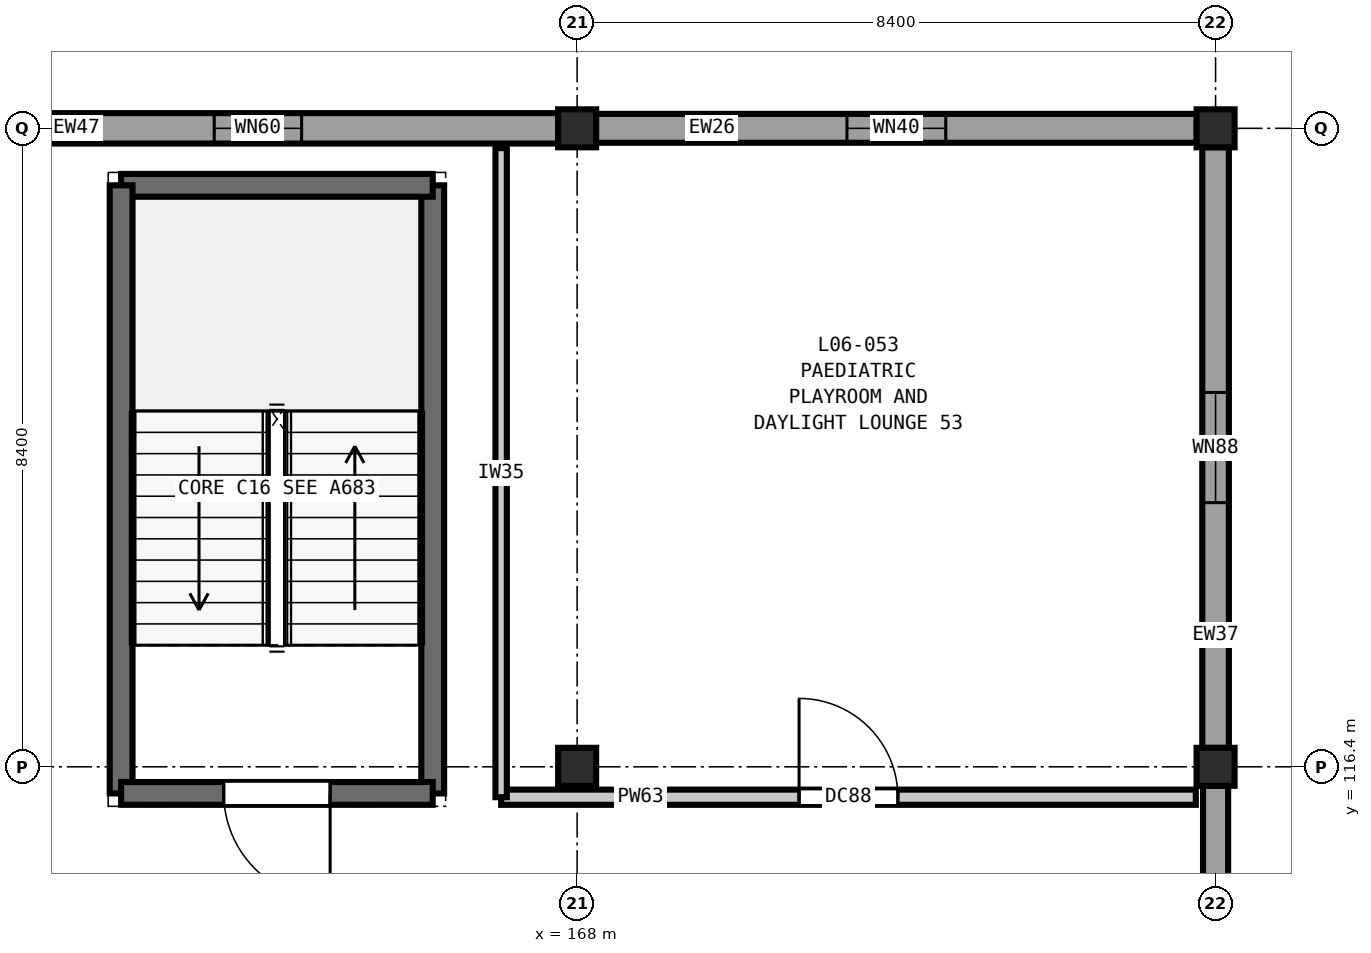
"""IFC4 building model, lengths in metres.
Left out: names, types, materials, properties, quantities, classifications, styles, units other than length and angle.
Written with IfcOpenShell. Run it as: python <this file> out.ifc"""

import sys

from ifc_helpers import new_model, si_unit, direction, frame, frame_2d, origin, origin_2d, place, context, subcontext, project, spatial, rectangle, extrude, element, fill, save


model = new_model("IFC4")
c1 = context("Model", 3, precision=1e-05, world=origin(), true_north=direction((0.0, 1.0)))
c2 = subcontext(c1, "Body", "Model", "MODEL_VIEW")
j1 = project(units=[si_unit("LENGTHUNIT", "METRE"), si_unit("PLANEANGLEUNIT", "RADIAN")], contexts=[c1])
p1 = place(None, origin())
s1 = spatial("IfcSite", under=j1, at=p1, CompositionType="ELEMENT")
p2 = place(p1, origin())
s2 = spatial("IfcBuilding", under=s1, at=p2, CompositionType="ELEMENT")
p3 = place(p2, frame((0.0, 0.0, 28.8)))
s3 = spatial("IfcBuildingStorey", under=s2, at=p3, CompositionType="ELEMENT", Elevation=28.8)
for number, where, z_axis, x_axis in (
    (1, (168.0, 116.4, 0.0), (0.0, 0.0, 1.0), (1.0, 0.0, 0.0)),
    (2, (168.0, 124.8, 0.0), (0.0, 0.0, 1.0), (1.0, 0.0, 0.0)),
    (3, (176.4, 116.4, 0.0), (0.0, 0.0, 1.0), (1.0, 0.0, 0.0)),
    (4, (176.4, 124.8, 0.0), (0.0, 0.0, 1.0), (1.0, 0.0, 0.0)),
):
    element("IfcColumn", number, at=place(p3, frame(where, z_axis=z_axis, x_axis=x_axis)), inside=s3, PredefinedType="COLUMN", context=c2, shape_type="SweptSolid", body=[
        extrude(rectangle(XDim=0.5, YDim=0.5, at=origin_2d()), origin(), (0.0, 0.0, 1.0), 4.2),
    ])
p4 = place(p3, frame((159.848, 124.8, 0.0), z_axis=(0.0, 0.0, 1.0), x_axis=(1.0, 0.0, 0.0)))
e5 = element("IfcWall", 5, at=p4, inside=s3, PredefinedType="SOLIDWALL", context=c2, shape_type="SweptSolid", body=[
    extrude(rectangle(XDim=7.904, YDim=0.4, at=frame_2d((3.952, 0.0))), origin(), (0.0, 0.0, 1.0), 3.48),
])
p5 = place(p4, frame((3.377, 0.0, 0.9)))
e6 = element("IfcOpeningElement", 6, at=p5, cuts=e5, PredefinedType="OPENING", context=c2, shape_type="SweptSolid", body=[
    extrude(rectangle(XDim=1.15, YDim=1.75, at=frame_2d((0.575, 0.875))), frame((0.0, 0.21, 0.0), z_axis=(0.0, -1.0, 0.0), x_axis=(1.0, 0.0, 0.0)), (0.0, 0.0, 1.0), 0.42),
])
p6 = place(p3, frame((168.248, 124.8, 0.0), z_axis=(0.0, 0.0, 1.0), x_axis=(1.0, 0.0, 0.0)))
e7 = element("IfcWall", 7, at=p6, inside=s3, PredefinedType="SOLIDWALL", context=c2, shape_type="SweptSolid", body=[
    extrude(rectangle(XDim=7.904, YDim=0.38, at=frame_2d((3.952, 0.0))), origin(), (0.0, 0.0, 1.0), 3.48),
])
p7 = place(p6, frame((3.302, 0.0, 0.9)))
e8 = element("IfcOpeningElement", 8, at=p7, cuts=e7, PredefinedType="OPENING", context=c2, shape_type="SweptSolid", body=[
    extrude(rectangle(XDim=1.3, YDim=1.75, at=frame_2d((0.65, 0.875))), frame((0.0, 0.2, 0.0), z_axis=(0.0, -1.0, 0.0), x_axis=(1.0, 0.0, 0.0)), (0.0, 0.0, 1.0), 0.4),
])
p8 = place(p3, frame((176.4, 124.552, 0.0), z_axis=(0.0, 0.0, 1.0), x_axis=(0.0, -1.0, 0.0)))
e9 = element("IfcWall", 9, at=p8, inside=s3, PredefinedType="SOLIDWALL", context=c2, shape_type="SweptSolid", body=[
    extrude(rectangle(XDim=7.904, YDim=0.35, at=frame_2d((3.952, 0.0))), origin(), (0.0, 0.0, 1.0), 3.48),
])
p9 = place(p8, frame((3.227, 0.0, 0.9)))
e10 = element("IfcOpeningElement", 10, at=p9, cuts=e9, PredefinedType="OPENING", context=c2, shape_type="SweptSolid", body=[
    extrude(rectangle(XDim=1.45, YDim=1.75, at=frame_2d((0.725, 0.875))), frame((0.0, 0.185, 0.0), z_axis=(0.0, -1.0, 0.0), x_axis=(1.0, 0.0, 0.0)), (0.0, 0.0, 1.0), 0.37),
])
p10 = place(p3, frame((176.4, 116.152, 0.0), z_axis=(0.0, 0.0, 1.0), x_axis=(0.0, -1.0, 0.0)))
e11 = element("IfcWall", 11, at=p10, inside=s3, PredefinedType="SOLIDWALL", context=c2, shape_type="SweptSolid", body=[
    extrude(rectangle(XDim=6.704, YDim=0.33, at=frame_2d((3.352, 0.0))), origin(), (0.0, 0.0, 1.0), 3.48),
])
p11 = place(p3, frame((166.1, 116.05, 0.0), z_axis=(0.0, 0.0, 1.0), x_axis=(0.0, 1.0, 0.0)))
e12 = element("IfcWall", 12, at=p11, inside=s3, PredefinedType="SHEAR", context=c2, shape_type="SweptSolid", body=[
    extrude(rectangle(XDim=8.0, YDim=0.3, at=frame_2d((4.0, 0.0))), origin(), (0.0, 0.0, 1.0), 4.2),
])
p12 = place(p3, frame((166.1, 124.05, 0.0), z_axis=(0.0, 0.0, 1.0), x_axis=(-1.0, 0.0, 0.0)))
e13 = element("IfcWall", 13, at=p12, inside=s3, PredefinedType="SHEAR", context=c2, shape_type="SweptSolid", body=[
    extrude(rectangle(XDim=4.1, YDim=0.3, at=frame_2d((2.05, 0.0))), origin(), (0.0, 0.0, 1.0), 4.2),
])
p13 = place(p3, frame((162.0, 124.05, 0.0), z_axis=(0.0, 0.0, 1.0), x_axis=(0.0, -1.0, 0.0)))
e14 = element("IfcWall", 14, at=p13, inside=s3, PredefinedType="SHEAR", context=c2, shape_type="SweptSolid", body=[
    extrude(rectangle(XDim=8.0, YDim=0.3, at=frame_2d((4.0, 0.0))), origin(), (0.0, 0.0, 1.0), 4.2),
])
p14 = place(p3, frame((162.0, 116.05, 0.0), z_axis=(0.0, 0.0, 1.0), x_axis=(1.0, 0.0, 0.0)))
e15 = element("IfcWall", 15, at=p14, inside=s3, PredefinedType="SHEAR", context=c2, shape_type="SweptSolid", body=[
    extrude(rectangle(XDim=4.1, YDim=0.3, at=frame_2d((2.05, 0.0))), origin(), (0.0, 0.0, 1.0), 4.2),
])
p15 = place(p14, frame((1.35, 0.0, 0.0)))
e16 = element("IfcOpeningElement", 16, at=p15, cuts=e15, PredefinedType="OPENING", context=c2, shape_type="SweptSolid", body=[
    extrude(rectangle(XDim=1.4, YDim=2.2, at=frame_2d((0.7, 1.1))), frame((0.0, 0.16, 0.0), z_axis=(0.0, -1.0, 0.0), x_axis=(1.0, 0.0, 0.0)), (0.0, 0.0, 1.0), 0.32),
])
p16 = place(p3, frame((167.0, 116.0, 0.0), z_axis=(0.0, 0.0, 1.0), x_axis=(1.0, 0.0, 0.0)))
e17 = element("IfcWall", 17, at=p16, inside=s3, PredefinedType="PARTITIONING", context=c2, shape_type="SweptSolid", body=[
    extrude(rectangle(XDim=9.14, YDim=0.2, at=frame_2d((4.57, 0.0))), origin(), (0.0, 0.0, 1.0), 3.92),
])
p17 = place(p16, frame((3.92, 0.0, 0.0)))
e18 = element("IfcOpeningElement", 18, at=p17, cuts=e17, PredefinedType="OPENING", context=c2, shape_type="SweptSolid", body=[
    extrude(rectangle(XDim=1.3, YDim=2.2, at=frame_2d((0.65, 1.1))), frame((0.0, 0.11, 0.0), z_axis=(0.0, -1.0, 0.0), x_axis=(1.0, 0.0, 0.0)), (0.0, 0.0, 1.0), 0.22),
])
p18 = place(p3, frame((167.0, 116.0, 0.0), z_axis=(0.0, 0.0, 1.0), x_axis=(0.0, 1.0, 0.0)))
e19 = element("IfcWall", 19, at=p18, inside=s3, PredefinedType="PARTITIONING", context=c2, shape_type="SweptSolid", body=[
    extrude(rectangle(XDim=8.54, YDim=0.15, at=frame_2d((4.27, 0.0))), origin(), (0.0, 0.0, 1.0), 3.92),
])
p19 = place(p5, origin())
e20 = element("IfcWindow", 20, at=p19, inside=s3, PartitioningType="SINGLE_PANEL", PredefinedType="WINDOW", context=c2, shape_type="SweptSolid", body=[
    extrude(rectangle(XDim=1.15, YDim=1.75, at=frame_2d((0.575, 0.875))), frame((0.0, 0.03, 0.0), z_axis=(0.0, -1.0, 0.0), x_axis=(1.0, 0.0, 0.0)), (0.0, 0.0, 1.0), 0.06),
])
fill(e6, e20)
p20 = place(p7, origin())
e21 = element("IfcWindow", 21, at=p20, inside=s3, PartitioningType="SINGLE_PANEL", PredefinedType="WINDOW", context=c2, shape_type="SweptSolid", body=[
    extrude(rectangle(XDim=1.3, YDim=1.75, at=frame_2d((0.65, 0.875))), frame((0.0, 0.03, 0.0), z_axis=(0.0, -1.0, 0.0), x_axis=(1.0, 0.0, 0.0)), (0.0, 0.0, 1.0), 0.06),
])
fill(e8, e21)
p21 = place(p9, origin())
e22 = element("IfcWindow", 22, at=p21, inside=s3, PartitioningType="SINGLE_PANEL", PredefinedType="WINDOW", context=c2, shape_type="SweptSolid", body=[
    extrude(rectangle(XDim=1.45, YDim=1.75, at=frame_2d((0.725, 0.875))), frame((0.0, 0.03, 0.0), z_axis=(0.0, -1.0, 0.0), x_axis=(1.0, 0.0, 0.0)), (0.0, 0.0, 1.0), 0.06),
])
fill(e10, e22)
p22 = place(p15, frame((1.4, 0.0, 0.0), z_axis=(0.0, 0.0, 1.0), x_axis=(-1.0, 0.0, 0.0)))
e23 = element("IfcDoor", 23, at=p22, inside=s3, OperationType="SINGLE_SWING_LEFT", PredefinedType="DOOR", context=c2, shape_type="SweptSolid", body=[
    extrude(rectangle(XDim=1.4, YDim=2.2, at=frame_2d((0.7, 1.1))), frame((0.0, 0.025, 0.0), z_axis=(0.0, -1.0, 0.0), x_axis=(1.0, 0.0, 0.0)), (0.0, 0.0, 1.0), 0.05),
])
fill(e16, e23)
p23 = place(p17, origin())
e24 = element("IfcDoor", 24, at=p23, inside=s3, OperationType="SINGLE_SWING_LEFT", PredefinedType="DOOR", context=c2, shape_type="SweptSolid", body=[
    extrude(rectangle(XDim=1.3, YDim=2.2, at=frame_2d((0.65, 1.1))), frame((0.0, 0.025, 0.0), z_axis=(0.0, -1.0, 0.0), x_axis=(1.0, 0.0, 0.0)), (0.0, 0.0, 1.0), 0.05),
])
fill(e18, e24)
save(model, sys.argv[1])
